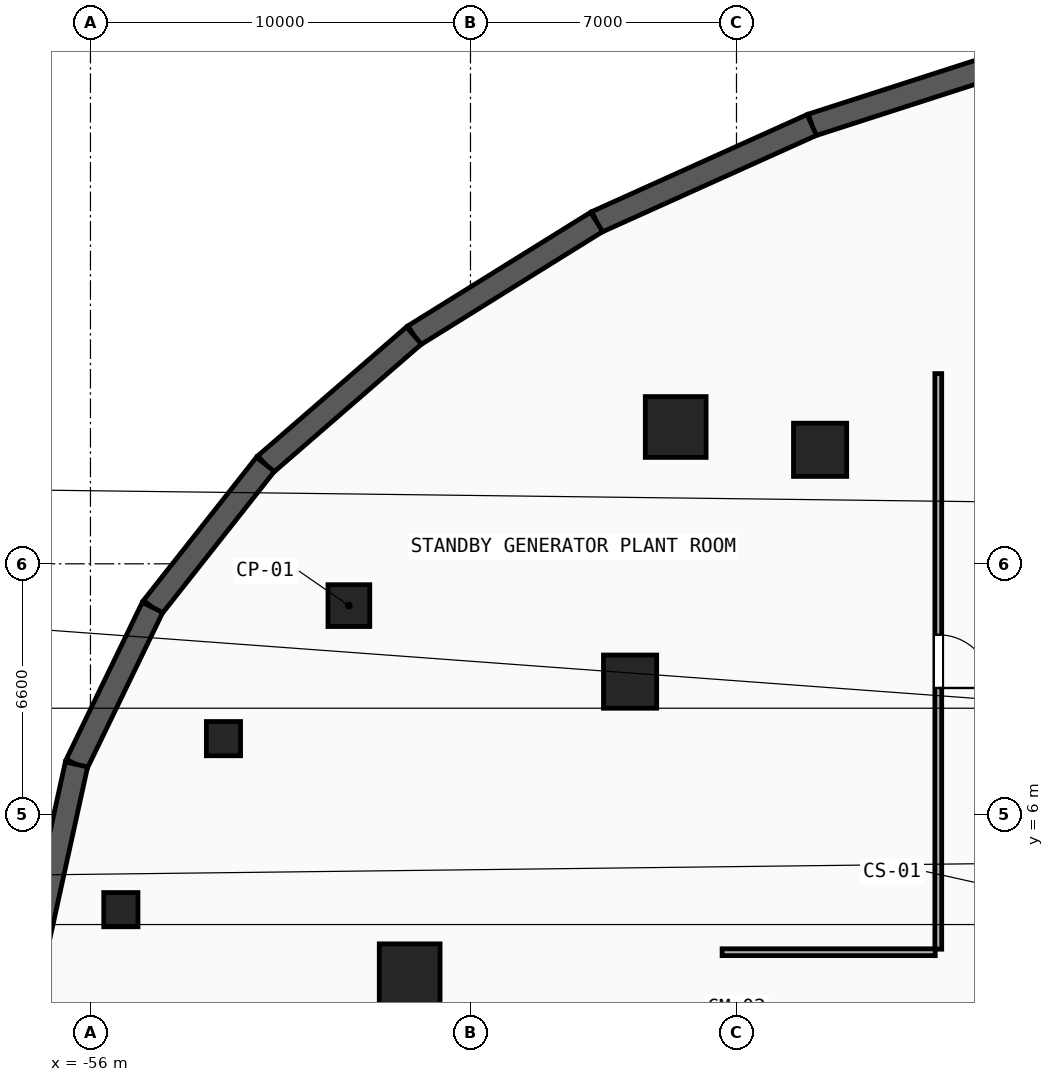
"""IFC4 building model, lengths in metres.
Left out: names, types, materials, properties, quantities, classifications, styles, units other than length and angle.
Written with IfcOpenShell. Run it as: python <this file> out.ifc"""

import sys

from ifc_helpers import new_model, si_unit, direction, frame, frame_2d, origin, origin_2d, place, context, subcontext, project, spatial, rectangle, circle, extrude, element, fill, save


model = new_model("IFC4")
c1 = context("Model", 3, precision=1e-05, world=origin(), true_north=direction((0.0, 1.0)))
c2 = subcontext(c1, "Body", "Model", "MODEL_VIEW")
j1 = project(units=[si_unit("LENGTHUNIT", "METRE"), si_unit("PLANEANGLEUNIT", "RADIAN")], contexts=[c1])
p1 = place(None, origin())
s1 = spatial("IfcSite", under=j1, at=p1, CompositionType="ELEMENT")
p2 = place(p1, origin())
s2 = spatial("IfcBuilding", under=s1, at=p2, CompositionType="ELEMENT")
p3 = place(p2, frame((0.0, 0.0, -4.5)))
s3 = spatial("IfcBuildingStorey", under=s2, at=p3, CompositionType="ELEMENT", Elevation=-4.5)
for number, where, z_axis, x_axis in (
    (1, (-41.8, 9.5, 0.0), (0.0, 0.0, 1.0), (1.0, 0.0, 0.0)),
    (2, (-36.8, 15.6, 0.0), (0.0, 0.0, 1.0), (1.0, 0.0, 0.0)),
):
    element("IfcColumn", number, at=place(p3, frame(where, z_axis=z_axis, x_axis=x_axis)), inside=s3, PredefinedType="COLUMN", context=c2, shape_type="SweptSolid", body=[
        extrude(rectangle(XDim=1.4, YDim=1.4, at=origin_2d()), origin(), (0.0, 0.0, 1.0), 4.5),
    ])
for number, where, z_axis, x_axis in (
    (3, (-40.6, 16.2, 0.0), (0.0, 0.0, 1.0), (1.0, 0.0, 0.0)),
    (4, (-47.6, 1.8, 0.0), (0.0, 0.0, 1.0), (1.0, 0.0, 0.0)),
):
    element("IfcColumn", number, at=place(p3, frame(where, z_axis=z_axis, x_axis=x_axis)), inside=s3, PredefinedType="COLUMN", context=c2, shape_type="SweptSolid", body=[
        extrude(rectangle(XDim=1.6, YDim=1.6, at=origin_2d()), origin(), (0.0, 0.0, 1.0), 4.5),
    ])
p4 = place(p3, frame((-49.2, 11.5, 0.0), z_axis=(0.0, 0.0, 1.0), x_axis=(1.0, 0.0, 0.0)))
e5 = element("IfcColumn", 5, at=p4, inside=s3, PredefinedType="PILASTER", context=c2, shape_type="SweptSolid", body=[
    extrude(circle(Radius=0.55, at=origin_2d()), origin(), (0.0, 0.0, 1.0), 4.5),
])
for number, where, z_axis, x_axis in (
    (6, (-52.5, 8.0, 0.0), (0.0, 0.0, 1.0), (1.0, 0.0, 0.0)),
    (7, (-55.2, 3.5, 0.0), (0.0, 0.0, 1.0), (1.0, 0.0, 0.0)),
):
    element("IfcColumn", number, at=place(p3, frame(where, z_axis=z_axis, x_axis=x_axis)), inside=s3, PredefinedType="COLUMN", context=c2, shape_type="SweptSolid", body=[
        extrude(rectangle(XDim=0.9, YDim=0.9, at=origin_2d()), origin(), (0.0, 0.0, 1.0), 4.5),
    ])
p5 = place(p3, frame((-30.546, 26.232, 0.0), z_axis=(0.0, 0.0, 1.0), x_axis=(-0.951843868052, -0.306583187492, 0.0)))
e8 = element("IfcWall", 8, at=p5, inside=s3, PredefinedType="USERDEFINED", context=c2, shape_type="SweptSolid", body=[
    extrude(rectangle(XDim=6.801, YDim=0.6, at=frame_2d((3.4, 0.0))), origin(), (0.0, 0.0, 1.0), 4.15),
])
p6 = place(p3, frame((-37.019, 24.147, 0.0), z_axis=(0.0, 0.0, 1.0), x_axis=(-0.911643952457, -0.410980904603, 0.0)))
e9 = element("IfcWall", 9, at=p6, inside=s3, PredefinedType="USERDEFINED", context=c2, shape_type="SweptSolid", body=[
    extrude(rectangle(XDim=6.209, YDim=0.6, at=frame_2d((3.105, 0.0))), origin(), (0.0, 0.0, 1.0), 4.15),
])
p7 = place(p3, frame((-42.68, 21.595, 0.0), z_axis=(0.0, 0.0, 1.0), x_axis=(-0.849299437699, -0.527911417877, 0.0)))
e10 = element("IfcWall", 10, at=p7, inside=s3, PredefinedType="USERDEFINED", context=c2, shape_type="SweptSolid", body=[
    extrude(rectangle(XDim=5.66, YDim=0.6, at=frame_2d((2.83, 0.0))), origin(), (0.0, 0.0, 1.0), 4.15),
])
p8 = place(p3, frame((-47.487, 18.607, 0.0), z_axis=(0.0, 0.0, 1.0), x_axis=(-0.755564536906, -0.655074217605, 0.0)))
e11 = element("IfcWall", 11, at=p8, inside=s3, PredefinedType="USERDEFINED", context=c2, shape_type="SweptSolid", body=[
    extrude(rectangle(XDim=5.175, YDim=0.6, at=frame_2d((2.587, 0.0))), origin(), (0.0, 0.0, 1.0), 4.15),
])
p9 = place(p3, frame((-51.397, 15.217, 0.0), z_axis=(0.0, 0.0, 1.0), x_axis=(-0.619447864054, -0.785037797637, 0.0)))
e12 = element("IfcWall", 12, at=p9, inside=s3, PredefinedType="USERDEFINED", context=c2, shape_type="SweptSolid", body=[
    extrude(rectangle(XDim=4.796, YDim=0.6, at=frame_2d((2.398, 0.0))), origin(), (0.0, 0.0, 1.0), 4.15),
])
p10 = place(p3, frame((-54.368, 11.452, 0.0), z_axis=(0.0, 0.0, 1.0), x_axis=(-0.435772260249, -0.900056963307, 0.0)))
e13 = element("IfcWall", 13, at=p10, inside=s3, PredefinedType="USERDEFINED", context=c2, shape_type="SweptSolid", body=[
    extrude(rectangle(XDim=4.59, YDim=0.6, at=frame_2d((2.295, 0.0))), origin(), (0.0, 0.0, 1.0), 4.15),
])
p11 = place(p3, frame((-56.368, 7.321, 0.0), z_axis=(0.0, 0.0, 1.0), x_axis=(-0.214510247434, -0.976721738135, 0.0)))
e14 = element("IfcWall", 14, at=p11, inside=s3, PredefinedType="USERDEFINED", context=c2, shape_type="SweptSolid", body=[
    extrude(rectangle(XDim=4.69, YDim=0.6, at=frame_2d((2.345, 0.0))), origin(), (0.0, 0.0, 1.0), 4.15),
])
p12 = place(p3, frame((-33.69, 17.605, 0.0), z_axis=(0.0, 0.0, 1.0), x_axis=(0.0, -1.0, 0.0)))
e15 = element("IfcWall", 15, at=p12, inside=s3, PredefinedType="PARTITIONING", context=c2, shape_type="SweptSolid", body=[
    extrude(rectangle(XDim=15.145, YDim=0.18, at=frame_2d((7.573, 0.0))), origin(), (0.0, 0.0, 1.0), 4.15),
])
p13 = place(p12, frame((6.873, 0.0, 0.0)))
e16 = element("IfcOpeningElement", 16, at=p13, cuts=e15, PredefinedType="OPENING", context=c2, shape_type="SweptSolid", body=[
    extrude(rectangle(XDim=1.4, YDim=2.2, at=frame_2d((0.7, 1.1))), frame((0.0, 0.1, 0.0), z_axis=(0.0, -1.0, 0.0), x_axis=(1.0, 0.0, 0.0)), (0.0, 0.0, 1.0), 0.2),
])
p14 = place(p3, frame((-33.77, 2.38, 0.0), z_axis=(0.0, 0.0, 1.0), x_axis=(-1.0, 0.0, 0.0)))
e17 = element("IfcWall", 17, at=p14, inside=s3, PredefinedType="PARTITIONING", context=c2, shape_type="SweptSolid", body=[
    extrude(rectangle(XDim=5.608, YDim=0.18, at=frame_2d((2.804, 0.0))), origin(), (0.0, 0.0, 1.0), 4.15),
])
p15 = place(p13, origin())
e18 = element("IfcDoor", 18, at=p15, inside=s3, OperationType="SINGLE_SWING_RIGHT", PredefinedType="DOOR", context=c2, shape_type="SweptSolid", body=[
    extrude(rectangle(XDim=1.4, YDim=2.2, at=frame_2d((0.7, 1.1))), frame((0.0, 0.025, 0.0), z_axis=(0.0, -1.0, 0.0), x_axis=(1.0, 0.0, 0.0)), (0.0, 0.0, 1.0), 0.05),
])
fill(e16, e18)
save(model, sys.argv[1])
